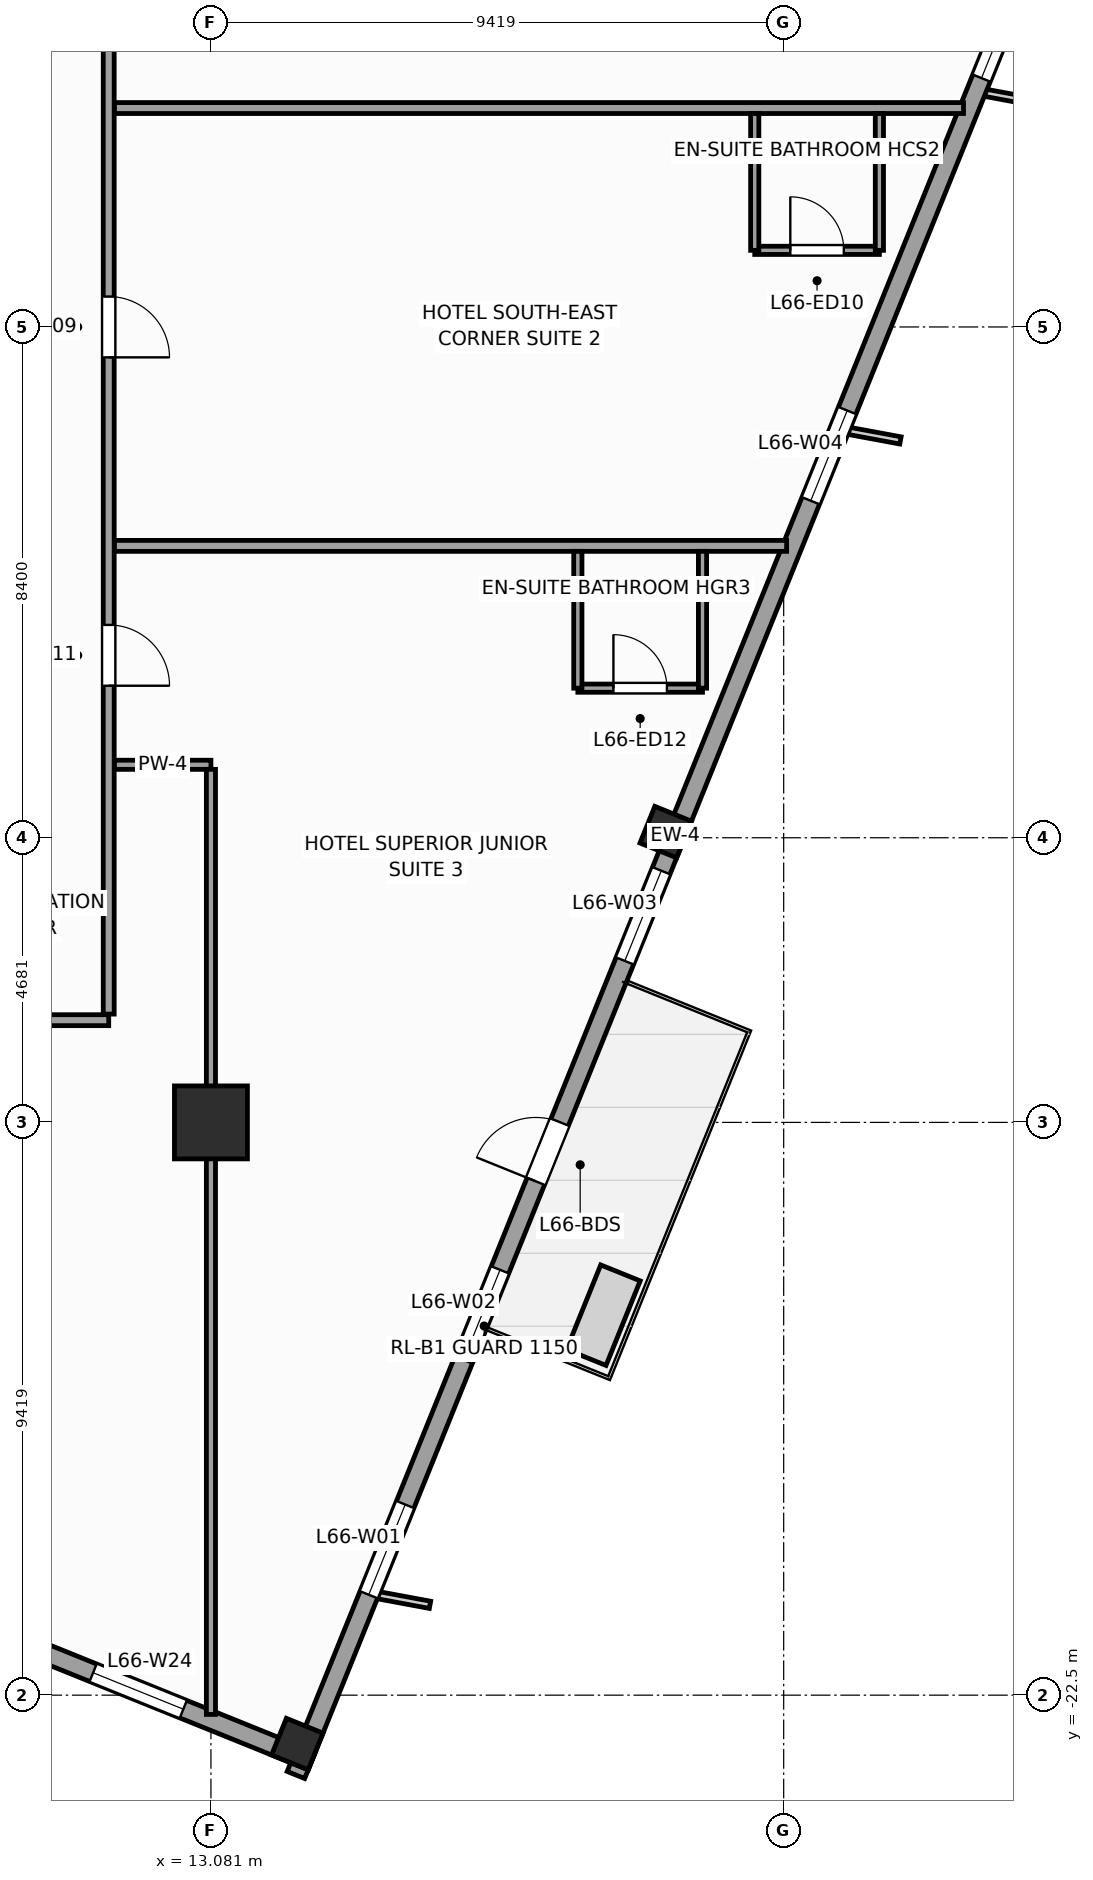
"""IFC4 building model, lengths in metres.
Left out: names, types, materials, properties, quantities, classifications, styles, units other than length and angle.
Written with IfcOpenShell. Run it as: python <this file> out.ifc"""

import sys

from ifc_helpers import new_model, si_unit, direction, frame, frame_2d, origin, origin_2d, place, context, subcontext, project, spatial, rectangle, extrude, source, transform, mapped, element, fill, save


model = new_model("IFC4")
c1 = context("Model", 3, precision=1e-05, world=origin(), true_north=direction((0.0, 1.0)))
c2 = subcontext(c1, "Body", "Model", "MODEL_VIEW")
j1 = project(units=[si_unit("LENGTHUNIT", "METRE"), si_unit("PLANEANGLEUNIT", "RADIAN")], contexts=[c1])
p1 = place(None, origin())
s1 = spatial("IfcSite", under=j1, at=p1, CompositionType="ELEMENT")
p2 = place(p1, origin())
s2 = spatial("IfcBuilding", under=s1, at=p2, CompositionType="ELEMENT")
p3 = place(p2, frame((0.0, 0.0, 272.4)))
s3 = spatial("IfcBuildingStorey", under=s2, at=p3, CompositionType="ELEMENT", Elevation=272.4)
m1 = source(origin(), c2, "Body", "SweptSolid", [
    extrude(rectangle(XDim=1.2, YDim=1.2, at=origin_2d()), origin(), (0.0, 0.0, 1.0), 3.6),
])
p4 = place(p3, frame((13.081, -13.081, 0.0), z_axis=(0.0, 0.0, 1.0), x_axis=(1.0, 0.0, 0.0)))
e1 = element("IfcColumn", 1, at=p4, inside=s3, PredefinedType="COLUMN", context=c2, shape_type="MappedRepresentation", body=[
    mapped(m1, transform((0.0, 0.0, 0.0), scale=1.0)),
])
m2 = source(origin(), c2, "Body", "SweptSolid", [
    extrude(rectangle(XDim=0.65, YDim=0.65, at=origin_2d()), origin(), (0.0, 0.0, 1.0), 3.6),
])
for number, where, z_axis, x_axis in (
    (2, (14.501, -23.304, 0.0), (0.0, 0.0, 1.0), (0.375, 0.927, 0.0)),
    (3, (20.56, -8.307, 0.0), (0.0, 0.0, 1.0), (0.375, 0.927, 0.0)),
):
    element("IfcColumn", number, at=place(p3, frame(where, z_axis=z_axis, x_axis=x_axis)), inside=s3, PredefinedType="COLUMN", context=c2, shape_type="MappedRepresentation", body=[
        mapped(m2, transform((0.0, 0.0, 0.0), scale=1.0)),
    ])
p5 = place(p3, frame((14.479, -23.813, 0.0), z_axis=(0.0, 0.0, 1.0), x_axis=(0.374609557019, 0.927182657188, 0.0)))
e4 = element("IfcWall", 4, at=p5, inside=s3, PredefinedType="STANDARD", context=c2, shape_type="SweptSolid", body=[
    extrude(rectangle(XDim=33.31, YDim=0.31, at=frame_2d((16.655, 0.0))), origin(), (0.0, 0.0, 1.0), 2.75),
])
p6 = place(p5, frame((10.53, 0.0, 0.0)))
e5 = element("IfcOpeningElement", 5, at=p6, cuts=e4, PredefinedType="OPENING", context=c2, shape_type="SweptSolid", body=[
    extrude(rectangle(XDim=1.05, YDim=2.25, at=frame_2d((0.525, 1.125))), frame((0.0, 0.165, 0.0), z_axis=(0.0, -1.0, 0.0), x_axis=(1.0, 0.0, 0.0)), (0.0, 0.0, 1.0), 0.33),
])
p7 = place(p5, frame((3.197, 0.0, 0.47)))
e6 = element("IfcOpeningElement", 6, at=p7, cuts=e4, PredefinedType="OPENING", context=c2, shape_type="SweptSolid", body=[
    extrude(rectangle(XDim=1.6, YDim=2.1, at=frame_2d((0.8, 1.05))), frame((0.0, 0.165, 0.0), z_axis=(0.0, -1.0, 0.0), x_axis=(1.0, 0.0, 0.0)), (0.0, 0.0, 1.0), 0.33),
])
p8 = place(p5, frame((7.36, 0.0, 0.47)))
e7 = element("IfcOpeningElement", 7, at=p8, cuts=e4, PredefinedType="OPENING", context=c2, shape_type="SweptSolid", body=[
    extrude(rectangle(XDim=1.6, YDim=2.1, at=frame_2d((0.8, 1.05))), frame((0.0, 0.165, 0.0), z_axis=(0.0, -1.0, 0.0), x_axis=(1.0, 0.0, 0.0)), (0.0, 0.0, 1.0), 0.33),
])
p9 = place(p5, frame((14.439, 0.0, 0.47)))
e8 = element("IfcOpeningElement", 8, at=p9, cuts=e4, PredefinedType="OPENING", context=c2, shape_type="SweptSolid", body=[
    extrude(rectangle(XDim=1.6, YDim=2.1, at=frame_2d((0.8, 1.05))), frame((0.0, 0.165, 0.0), z_axis=(0.0, -1.0, 0.0), x_axis=(1.0, 0.0, 0.0)), (0.0, 0.0, 1.0), 0.33),
])
p10 = place(p5, frame((22.601, 0.0, 0.47)))
e9 = element("IfcOpeningElement", 9, at=p10, cuts=e4, PredefinedType="OPENING", context=c2, shape_type="SweptSolid", body=[
    extrude(rectangle(XDim=1.6, YDim=2.1, at=frame_2d((0.8, 1.05))), frame((0.0, 0.165, 0.0), z_axis=(0.0, -1.0, 0.0), x_axis=(1.0, 0.0, 0.0)), (0.0, 0.0, 1.0), 0.33),
])
p11 = place(p5, frame((30.097, 0.0, 0.47)))
e10 = element("IfcOpeningElement", 10, at=p11, cuts=e4, PredefinedType="OPENING", context=c2, shape_type="SweptSolid", body=[
    extrude(rectangle(XDim=1.6, YDim=2.1, at=frame_2d((0.8, 1.05))), frame((0.0, 0.165, 0.0), z_axis=(0.0, -1.0, 0.0), x_axis=(1.0, 0.0, 0.0)), (0.0, 0.0, 1.0), 0.33),
])
p12 = place(p3, frame((9.032, -21.278, 0.0), z_axis=(0.0, 0.0, 1.0), x_axis=(0.927185411764, -0.374602739196, 0.0)))
e11 = element("IfcWall", 11, at=p12, inside=s3, PredefinedType="STANDARD", context=c2, shape_type="SweptSolid", body=[
    extrude(rectangle(XDim=6.155, YDim=0.31, at=frame_2d((3.078, 0.0))), origin(), (0.0, 0.0, 1.0), 3.35),
])
p13 = place(p12, frame((2.278, 0.0, 0.47)))
e12 = element("IfcOpeningElement", 12, at=p13, cuts=e11, PredefinedType="OPENING", context=c2, shape_type="SweptSolid", body=[
    extrude(rectangle(XDim=1.6, YDim=2.1, at=frame_2d((0.8, 1.05))), frame((0.0, 0.165, 0.0), z_axis=(0.0, -1.0, 0.0), x_axis=(1.0, 0.0, 0.0)), (0.0, 0.0, 1.0), 0.33),
])
p14 = place(p3, frame((-10.3, -11.4, 0.0), z_axis=(0.0, 0.0, 1.0), x_axis=(1.0, 0.0, 0.0)))
e13 = element("IfcWall", 13, at=p14, inside=s3, PredefinedType="PARTITIONING", context=c2, shape_type="SweptSolid", body=[
    extrude(rectangle(XDim=21.7, YDim=0.18, at=frame_2d((10.85, 0.0))), origin(), (0.0, 0.0, 1.0), 3.35),
])
p15 = place(p14, frame((1.605, 0.0, 0.0)))
e14 = element("IfcOpeningElement", 14, at=p15, cuts=e13, PredefinedType="OPENING", context=c2, shape_type="SweptSolid", body=[
    extrude(rectangle(XDim=0.95, YDim=2.1, at=frame_2d((0.475, 1.05))), frame((0.0, 0.1, 0.0), z_axis=(0.0, -1.0, 0.0), x_axis=(1.0, 0.0, 0.0)), (0.0, 0.0, 1.0), 0.2),
])
p16 = place(p14, frame((17.236, 0.0, 0.0)))
e15 = element("IfcOpeningElement", 15, at=p16, cuts=e13, PredefinedType="OPENING", context=c2, shape_type="SweptSolid", body=[
    extrude(rectangle(XDim=1.0, YDim=2.15, at=frame_2d((0.5, 1.075))), frame((0.0, 0.1, 0.0), z_axis=(0.0, -1.0, 0.0), x_axis=(1.0, 0.0, 0.0)), (0.0, 0.0, 1.0), 0.2),
])
p17 = place(p14, frame((9.8, 0.0, 0.0)))
e16 = element("IfcOpeningElement", 16, at=p17, cuts=e13, PredefinedType="OPENING", context=c2, shape_type="SweptSolid", body=[
    extrude(rectangle(XDim=1.0, YDim=2.15, at=frame_2d((0.5, 1.075))), frame((0.0, 0.1, 0.0), z_axis=(0.0, -1.0, 0.0), x_axis=(1.0, 0.0, 0.0)), (0.0, 0.0, 1.0), 0.2),
])
p18 = place(p3, frame((11.4, -11.3, 0.0), z_axis=(0.0, 0.0, 1.0), x_axis=(0.0, 1.0, 0.0)))
e17 = element("IfcWall", 17, at=p18, inside=s3, PredefinedType="PARTITIONING", context=c2, shape_type="SweptSolid", body=[
    extrude(rectangle(XDim=21.5, YDim=0.18, at=frame_2d((10.75, 0.0))), origin(), (0.0, 0.0, 1.0), 3.35),
])
p19 = place(p18, frame((17.536, 0.0, 0.0)))
e18 = element("IfcOpeningElement", 18, at=p19, cuts=e17, PredefinedType="OPENING", context=c2, shape_type="SweptSolid", body=[
    extrude(rectangle(XDim=1.0, YDim=2.15, at=frame_2d((0.5, 1.075))), frame((0.0, 0.1, 0.0), z_axis=(0.0, -1.0, 0.0), x_axis=(1.0, 0.0, 0.0)), (0.0, 0.0, 1.0), 0.2),
])
p20 = place(p18, frame((10.8, 0.0, 0.0)))
e19 = element("IfcOpeningElement", 19, at=p20, cuts=e17, PredefinedType="OPENING", context=c2, shape_type="SweptSolid", body=[
    extrude(rectangle(XDim=1.0, YDim=2.15, at=frame_2d((0.5, 1.075))), frame((0.0, 0.1, 0.0), z_axis=(0.0, -1.0, 0.0), x_axis=(1.0, 0.0, 0.0)), (0.0, 0.0, 1.0), 0.2),
])
p21 = place(p18, frame((5.4, 0.0, 0.0)))
e20 = element("IfcOpeningElement", 20, at=p21, cuts=e17, PredefinedType="OPENING", context=c2, shape_type="SweptSolid", body=[
    extrude(rectangle(XDim=1.0, YDim=2.15, at=frame_2d((0.5, 1.075))), frame((0.0, 0.1, 0.0), z_axis=(0.0, -1.0, 0.0), x_axis=(1.0, 0.0, 0.0)), (0.0, 0.0, 1.0), 0.2),
])
p22 = place(p3, frame((11.495, 3.6, 0.0), z_axis=(0.0, 0.0, 1.0), x_axis=(1.0, 0.0, 0.0)))
e21 = element("IfcWall", 21, at=p22, inside=s3, PredefinedType="PARTITIONING", context=c2, shape_type="SweptSolid", body=[
    extrude(rectangle(XDim=13.962, YDim=0.18, at=frame_2d((6.981, 0.0))), origin(), (0.0, 0.0, 1.0), 3.35),
])
p23 = place(p3, frame((11.495, -3.6, 0.0), z_axis=(0.0, 0.0, 1.0), x_axis=(1.0, 0.0, 0.0)))
e22 = element("IfcWall", 22, at=p23, inside=s3, PredefinedType="PARTITIONING", context=c2, shape_type="SweptSolid", body=[
    extrude(rectangle(XDim=11.053, YDim=0.18, at=frame_2d((5.527, 0.0))), origin(), (0.0, 0.0, 1.0), 3.35),
])
p24 = place(p3, frame((11.495, -7.2, 0.0), z_axis=(0.0, 0.0, 1.0), x_axis=(1.0, 0.0, 0.0)))
e23 = element("IfcWall", 23, at=p24, inside=s3, PredefinedType="PARTITIONING", context=c2, shape_type="SweptSolid", body=[
    extrude(rectangle(XDim=1.586, YDim=0.15, at=frame_2d((0.793, 0.0))), origin(), (0.0, 0.0, 1.0), 3.35),
])
p25 = place(p3, frame((13.081, -7.275, 0.0), z_axis=(0.0, 0.0, 1.0), x_axis=(0.0, -1.0, 0.0)))
e24 = element("IfcWall", 24, at=p25, inside=s3, PredefinedType="PARTITIONING", context=c2, shape_type="SweptSolid", body=[
    extrude(rectangle(XDim=15.542, YDim=0.15, at=frame_2d((7.771, 0.0))), origin(), (0.0, 0.0, 1.0), 2.45),
])
p26 = place(p3, frame((22.024, 1.26, 0.0), z_axis=(0.0, 0.0, 1.0), x_axis=(1.0, 0.0, 0.0)))
e25 = element("IfcWall", 25, at=p26, inside=s3, PredefinedType="PARTITIONING", context=c2, shape_type="SweptSolid", body=[
    extrude(rectangle(XDim=2.05, YDim=0.135, at=frame_2d((1.025, 0.0))), origin(), (0.0, 0.0, 1.0), 3.35),
])
p27 = place(p26, frame((0.585, 0.0, 0.0)))
e26 = element("IfcOpeningElement", 26, at=p27, cuts=e25, PredefinedType="OPENING", context=c2, shape_type="SweptSolid", body=[
    extrude(rectangle(XDim=0.88, YDim=2.1, at=frame_2d((0.44, 1.05))), frame((0.0, 0.078, 0.0), z_axis=(0.0, -1.0, 0.0), x_axis=(1.0, 0.0, 0.0)), (0.0, 0.0, 1.0), 0.155),
])
for number, where, z_axis, x_axis in (
    (27, (24.074, 1.26, 0.0), (0.0, 0.0, 1.0), (0.0, 1.0, 0.0)),
    (28, (22.024, 1.26, 0.0), (0.0, 0.0, 1.0), (0.0, 1.0, 0.0)),
):
    element("IfcWall", number, at=place(p3, frame(where, z_axis=z_axis, x_axis=x_axis)), inside=s3, PredefinedType="PARTITIONING", context=c2, shape_type="SweptSolid", body=[
        extrude(rectangle(XDim=2.25, YDim=0.135, at=frame_2d((1.125, 0.0))), origin(), (0.0, 0.0, 1.0), 3.35),
    ])
p28 = place(p3, frame((19.115, -5.94, 0.0), z_axis=(0.0, 0.0, 1.0), x_axis=(1.0, 0.0, 0.0)))
e29 = element("IfcWall", 29, at=p28, inside=s3, PredefinedType="PARTITIONING", context=c2, shape_type="SweptSolid", body=[
    extrude(rectangle(XDim=2.05, YDim=0.135, at=frame_2d((1.025, 0.0))), origin(), (0.0, 0.0, 1.0), 3.35),
])
p29 = place(p28, frame((0.585, 0.0, 0.0)))
e30 = element("IfcOpeningElement", 30, at=p29, cuts=e29, PredefinedType="OPENING", context=c2, shape_type="SweptSolid", body=[
    extrude(rectangle(XDim=0.88, YDim=2.1, at=frame_2d((0.44, 1.05))), frame((0.0, 0.078, 0.0), z_axis=(0.0, -1.0, 0.0), x_axis=(1.0, 0.0, 0.0)), (0.0, 0.0, 1.0), 0.155),
])
for number, where, z_axis, x_axis in (
    (31, (21.165, -5.94, 0.0), (0.0, 0.0, 1.0), (0.0, 1.0, 0.0)),
    (32, (19.115, -5.94, 0.0), (0.0, 0.0, 1.0), (0.0, 1.0, 0.0)),
):
    element("IfcWall", number, at=place(p3, frame(where, z_axis=z_axis, x_axis=x_axis)), inside=s3, PredefinedType="PARTITIONING", context=c2, shape_type="SweptSolid", body=[
        extrude(rectangle(XDim=2.25, YDim=0.135, at=frame_2d((1.125, 0.0))), origin(), (0.0, 0.0, 1.0), 3.35),
    ])
m3 = source(origin(), c2, "Body", "SweptSolid", [
    extrude(rectangle(XDim=1.05, YDim=2.25, at=frame_2d((0.525, 1.125))), frame((0.0, 0.025, 0.0), z_axis=(0.0, -1.0, 0.0), x_axis=(1.0, 0.0, 0.0)), (0.0, 0.0, 1.0), 0.05),
])
p30 = place(p6, origin())
e33 = element("IfcDoor", 33, at=p30, inside=s3, OperationType="SINGLE_SWING_LEFT", PredefinedType="DOOR", context=c2, shape_type="MappedRepresentation", body=[
    mapped(m3, transform((0.0, 0.0, 0.0), scale=1.0)),
])
fill(e5, e33)
m4 = source(origin(), c2, "Body", "SweptSolid", [
    extrude(rectangle(XDim=1.6, YDim=2.1, at=frame_2d((0.8, 1.05))), frame((0.0, 0.03, 0.0), z_axis=(0.0, -1.0, 0.0), x_axis=(1.0, 0.0, 0.0)), (0.0, 0.0, 1.0), 0.06),
])
p31 = place(p7, origin())
e34 = element("IfcWindow", 34, at=p31, inside=s3, PartitioningType="SINGLE_PANEL", PredefinedType="WINDOW", context=c2, shape_type="MappedRepresentation", body=[
    mapped(m4, transform((0.0, 0.0, 0.0), scale=1.0)),
])
fill(e6, e34)
p32 = place(p8, origin())
e35 = element("IfcWindow", 35, at=p32, inside=s3, PartitioningType="SINGLE_PANEL", PredefinedType="WINDOW", context=c2, shape_type="MappedRepresentation", body=[
    mapped(m4, transform((0.0, 0.0, 0.0), scale=1.0)),
])
fill(e7, e35)
p33 = place(p9, origin())
e36 = element("IfcWindow", 36, at=p33, inside=s3, PartitioningType="SINGLE_PANEL", PredefinedType="WINDOW", context=c2, shape_type="MappedRepresentation", body=[
    mapped(m4, transform((0.0, 0.0, 0.0), scale=1.0)),
])
fill(e8, e36)
p34 = place(p10, origin())
e37 = element("IfcWindow", 37, at=p34, inside=s3, PartitioningType="SINGLE_PANEL", PredefinedType="WINDOW", context=c2, shape_type="MappedRepresentation", body=[
    mapped(m4, transform((0.0, 0.0, 0.0), scale=1.0)),
])
fill(e9, e37)
p35 = place(p11, origin())
e38 = element("IfcWindow", 38, at=p35, inside=s3, PartitioningType="SINGLE_PANEL", PredefinedType="WINDOW", context=c2, shape_type="MappedRepresentation", body=[
    mapped(m4, transform((0.0, 0.0, 0.0), scale=1.0)),
])
fill(e10, e38)
p36 = place(p13, origin())
e39 = element("IfcWindow", 39, at=p36, inside=s3, PartitioningType="SINGLE_PANEL", PredefinedType="WINDOW", context=c2, shape_type="MappedRepresentation", body=[
    mapped(m4, transform((0.0, 0.0, 0.0), scale=1.0)),
])
fill(e12, e39)
m5 = source(origin(), c2, "Body", "SweptSolid", [
    extrude(rectangle(XDim=1.0, YDim=2.15, at=frame_2d((0.5, 1.075))), frame((0.0, 0.025, 0.0), z_axis=(0.0, -1.0, 0.0), x_axis=(1.0, 0.0, 0.0)), (0.0, 0.0, 1.0), 0.05),
])
p37 = place(p20, frame((1.0, 0.0, 0.0), z_axis=(0.0, 0.0, 1.0), x_axis=(-1.0, 0.0, 0.0)))
e40 = element("IfcDoor", 40, at=p37, inside=s3, OperationType="SINGLE_SWING_LEFT", PredefinedType="DOOR", context=c2, shape_type="MappedRepresentation", body=[
    mapped(m5, transform((0.0, 0.0, 0.0), scale=1.0)),
])
fill(e19, e40)
m6 = source(origin(), c2, "Body", "SweptSolid", [
    extrude(rectangle(XDim=0.88, YDim=2.1, at=frame_2d((0.44, 1.05))), frame((0.0, 0.025, 0.0), z_axis=(0.0, -1.0, 0.0), x_axis=(1.0, 0.0, 0.0)), (0.0, 0.0, 1.0), 0.05),
])
p38 = place(p27, origin())
e41 = element("IfcDoor", 41, at=p38, inside=s3, OperationType="SINGLE_SWING_LEFT", PredefinedType="DOOR", context=c2, shape_type="MappedRepresentation", body=[
    mapped(m6, transform((0.0, 0.0, 0.0), scale=1.0)),
])
fill(e26, e41)
p39 = place(p21, frame((1.0, 0.0, 0.0), z_axis=(0.0, 0.0, 1.0), x_axis=(-1.0, 0.0, 0.0)))
e42 = element("IfcDoor", 42, at=p39, inside=s3, OperationType="SINGLE_SWING_LEFT", PredefinedType="DOOR", context=c2, shape_type="MappedRepresentation", body=[
    mapped(m5, transform((0.0, 0.0, 0.0), scale=1.0)),
])
fill(e20, e42)
p40 = place(p29, origin())
e43 = element("IfcDoor", 43, at=p40, inside=s3, OperationType="SINGLE_SWING_LEFT", PredefinedType="DOOR", context=c2, shape_type="MappedRepresentation", body=[
    mapped(m6, transform((0.0, 0.0, 0.0), scale=1.0)),
])
fill(e30, e43)
save(model, sys.argv[1])
